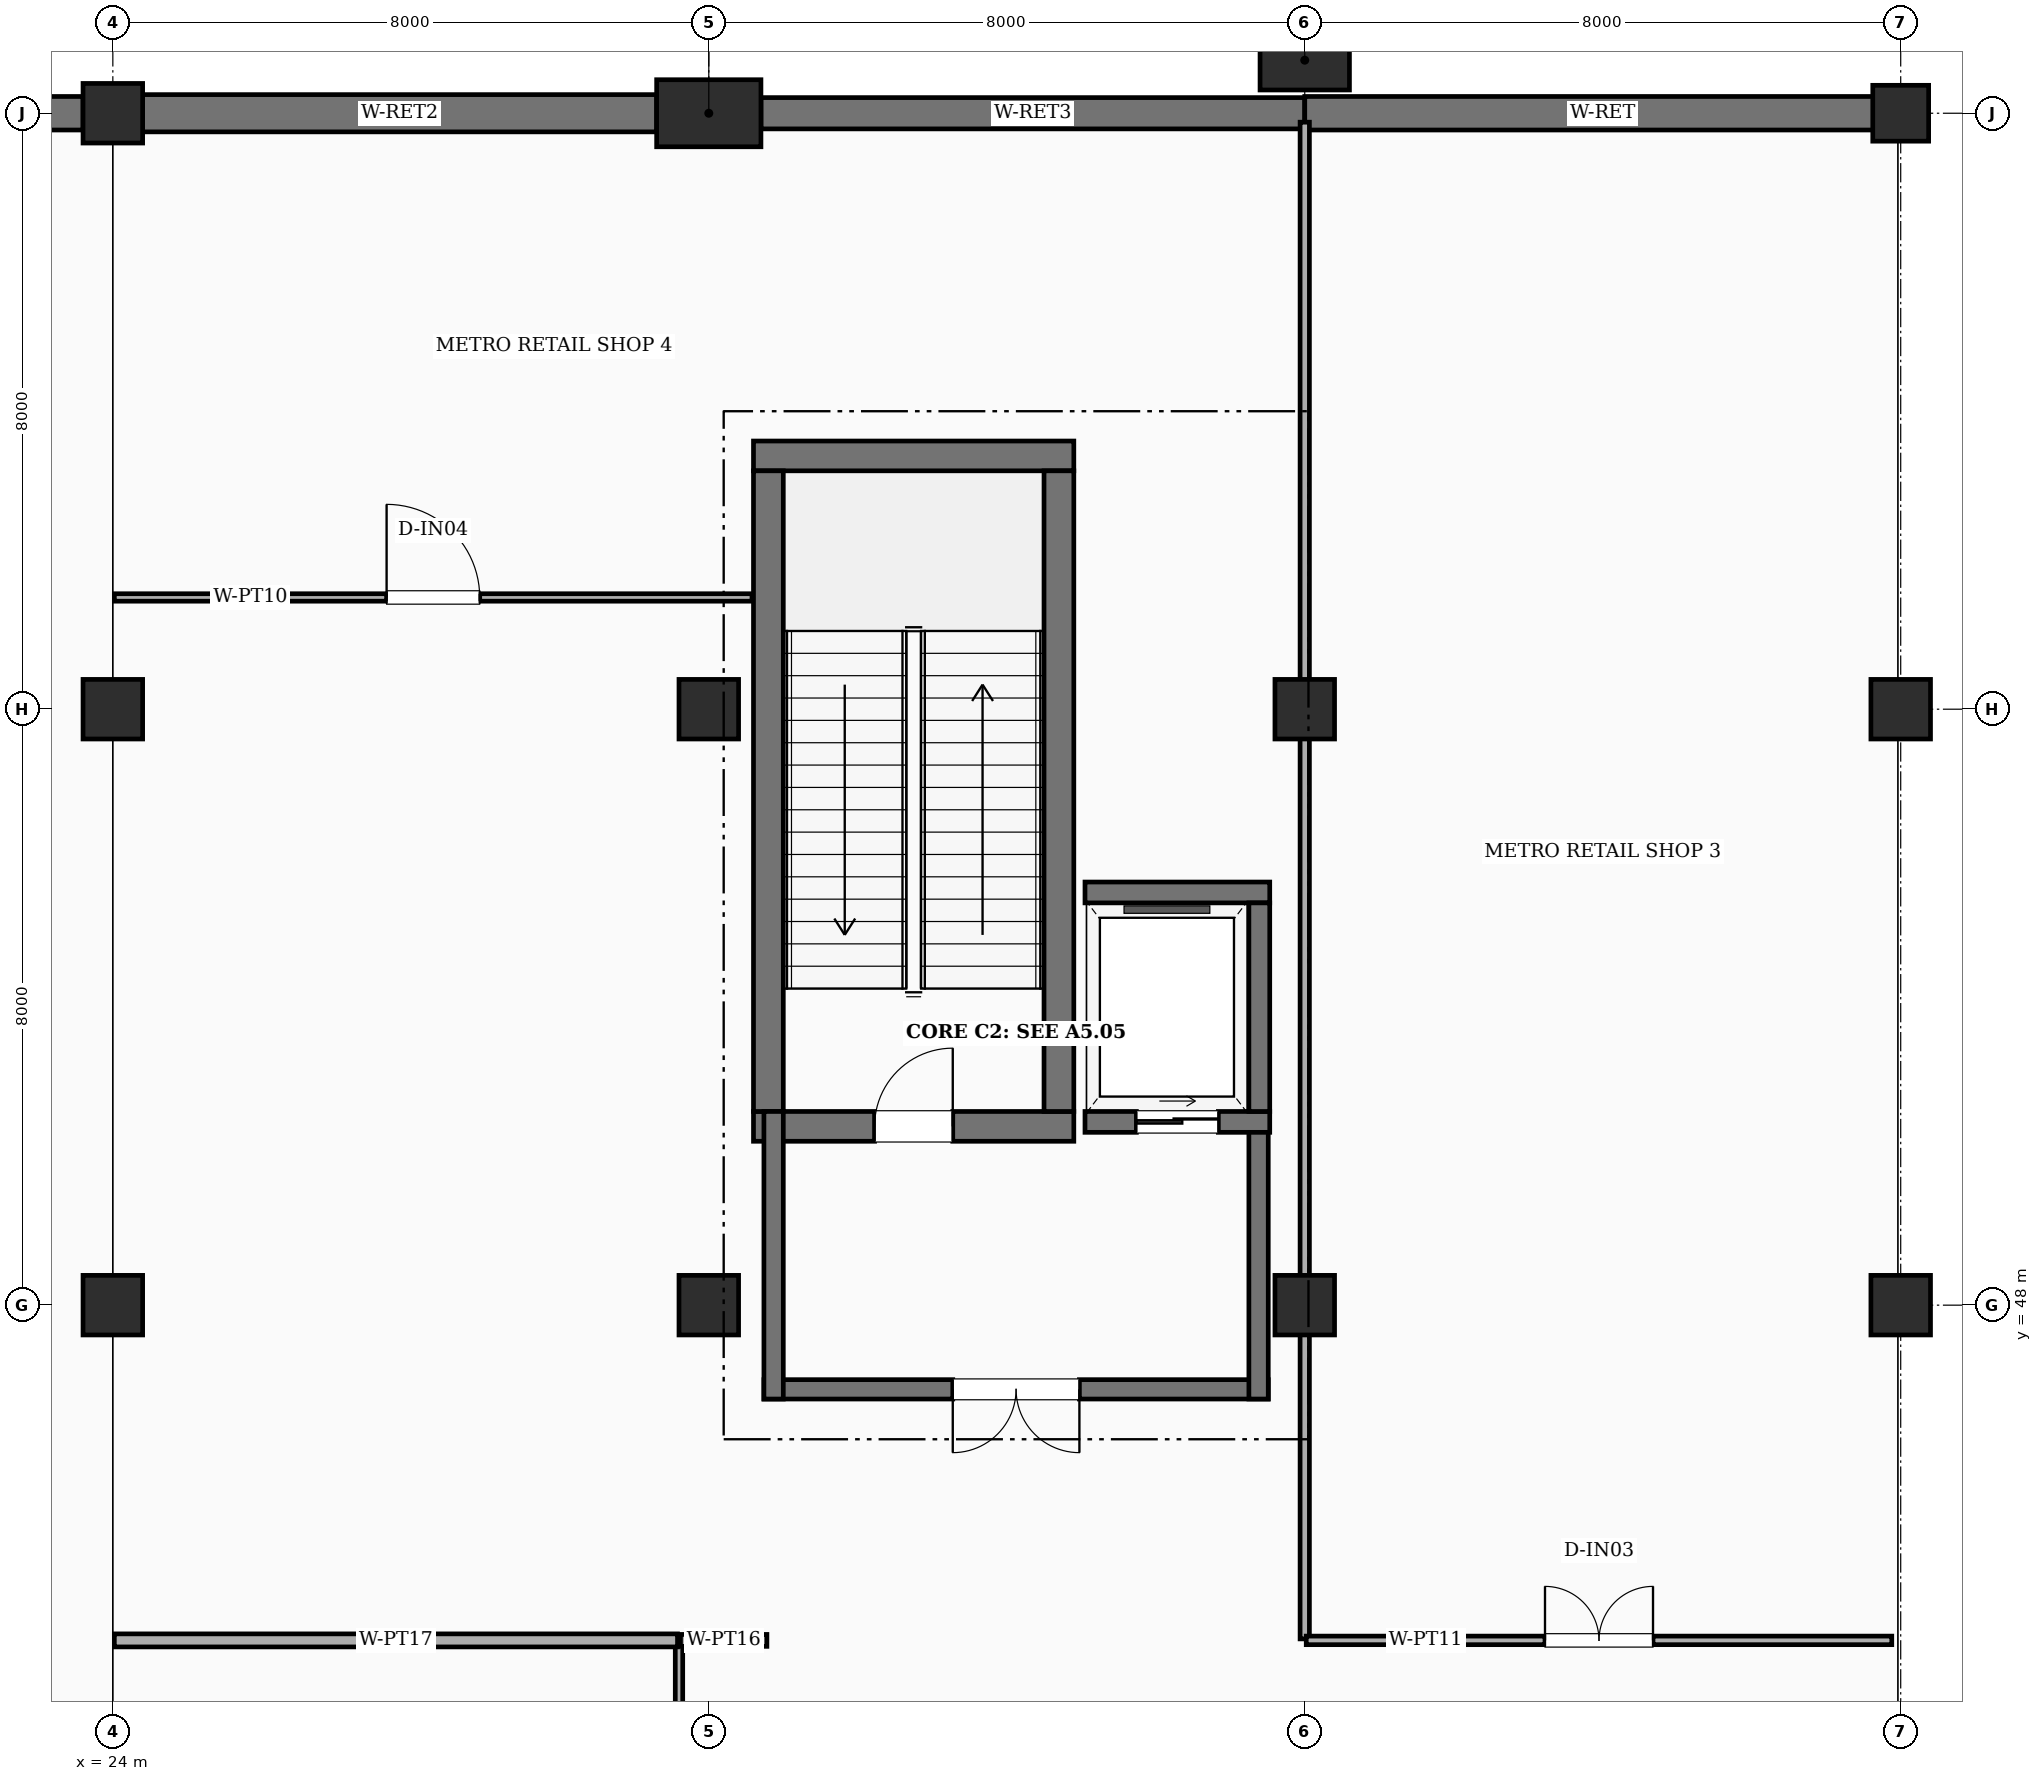
"""IFC4 building model, lengths in metres.
Left out: names, types, materials, properties, quantities, classifications, styles, units other than length and angle.
Written with IfcOpenShell. Run it as: python <this file> out.ifc"""

import sys

from ifc_helpers import new_model, si_unit, direction, frame, frame_2d, origin, origin_2d, place, context, subcontext, project, spatial, rectangle, extrude, element, fill, save


model = new_model("IFC4")
c1 = context("Model", 3, precision=1e-05, world=origin(), true_north=direction((0.0, 1.0)))
c2 = subcontext(c1, "Body", "Model", "MODEL_VIEW")
j1 = project(units=[si_unit("LENGTHUNIT", "METRE"), si_unit("PLANEANGLEUNIT", "RADIAN")], contexts=[c1])
p1 = place(None, origin())
s1 = spatial("IfcSite", under=j1, at=p1, CompositionType="ELEMENT")
p2 = place(p1, origin())
s2 = spatial("IfcBuilding", under=s1, at=p2, CompositionType="ELEMENT")
p3 = place(p2, frame((0.0, 0.0, -5.4)))
s3 = spatial("IfcBuildingStorey", under=s2, at=p3, CompositionType="ELEMENT", Elevation=-5.4)
p4 = place(p3, frame((32.0, 64.0, -0.4), z_axis=(0.0, 0.0, 1.0), x_axis=(1.0, 0.0, 0.0)))
e1 = element("IfcColumn", 1, at=p4, inside=s3, PredefinedType="COLUMN", context=c2, shape_type="SweptSolid", body=[
    extrude(rectangle(XDim=1.4, YDim=0.9, at=origin_2d()), origin(), (0.0, 0.0, 1.0), 5.8),
])
p5 = place(p3, frame((40.0, 64.712, -0.4), z_axis=(0.0, 0.0, 1.0), x_axis=(1.0, 0.0, 0.0)))
e2 = element("IfcColumn", 2, at=p5, inside=s3, PredefinedType="COLUMN", context=c2, shape_type="SweptSolid", body=[
    extrude(rectangle(XDim=1.2, YDim=0.8, at=origin_2d()), origin(), (0.0, 0.0, 1.0), 5.8),
])
for number, where, z_axis, x_axis in (
    (3, (24.0, 48.0, -0.4), (0.0, 0.0, 1.0), (1.0, 0.0, 0.0)),
    (4, (24.0, 56.0, -0.4), (0.0, 0.0, 1.0), (1.0, 0.0, 0.0)),
    (5, (24.0, 64.0, -0.4), (0.0, 0.0, 1.0), (1.0, 0.0, 0.0)),
    (6, (32.0, 48.0, -0.4), (0.0, 0.0, 1.0), (1.0, 0.0, 0.0)),
    (7, (32.0, 56.0, -0.4), (0.0, 0.0, 1.0), (1.0, 0.0, 0.0)),
    (8, (40.0, 48.0, -0.4), (0.0, 0.0, 1.0), (1.0, 0.0, 0.0)),
    (9, (40.0, 56.0, -0.4), (0.0, 0.0, 1.0), (1.0, 0.0, 0.0)),
    (10, (48.0, 48.0, -0.4), (0.0, 0.0, 1.0), (1.0, 0.0, 0.0)),
    (11, (48.0, 56.0, -0.4), (0.0, 0.0, 1.0), (1.0, 0.0, 0.0)),
):
    element("IfcColumn", number, at=place(p3, frame(where, z_axis=z_axis, x_axis=x_axis)), inside=s3, PredefinedType="COLUMN", context=c2, shape_type="SweptSolid", body=[
        extrude(rectangle(XDim=0.8, YDim=0.8, at=origin_2d()), origin(), (0.0, 0.0, 1.0), 5.8),
    ])
p6 = place(p3, frame((48.0, 64.0, -0.4), z_axis=(0.0, 0.0, 1.0), x_axis=(1.0, 0.0, 0.0)))
e12 = element("IfcColumn", 12, at=p6, inside=s3, PredefinedType="COLUMN", context=c2, shape_type="SweptSolid", body=[
    extrude(rectangle(XDim=0.75, YDim=0.75, at=origin_2d()), origin(), (0.0, 0.0, 1.0), 5.8),
])
p7 = place(p3, frame((16.375, 64.0, 0.0), z_axis=(0.0, 0.0, 1.0), x_axis=(1.0, 0.0, 0.0)))
e13 = element("IfcWall", 13, at=p7, inside=s3, PredefinedType="USERDEFINED", context=c2, shape_type="SweptSolid", body=[
    extrude(rectangle(XDim=7.225, YDim=0.45, at=frame_2d((3.613, 0.0))), origin(), (0.0, 0.0, 1.0), 5.0),
])
p8 = place(p3, frame((24.4, 64.0, 0.0), z_axis=(0.0, 0.0, 1.0), x_axis=(1.0, 0.0, 0.0)))
e14 = element("IfcWall", 14, at=p8, inside=s3, PredefinedType="USERDEFINED", context=c2, shape_type="SweptSolid", body=[
    extrude(rectangle(XDim=6.9, YDim=0.5, at=frame_2d((3.45, 0.0))), origin(), (0.0, 0.0, 1.0), 5.0),
])
p9 = place(p3, frame((32.7, 64.0, 0.0), z_axis=(0.0, 0.0, 1.0), x_axis=(1.0, 0.0, 0.0)))
e15 = element("IfcWall", 15, at=p9, inside=s3, PredefinedType="USERDEFINED", context=c2, shape_type="SweptSolid", body=[
    extrude(rectangle(XDim=7.3, YDim=0.42, at=frame_2d((3.65, 0.0))), origin(), (0.0, 0.0, 1.0), 4.15),
])
p10 = place(p3, frame((40.0, 64.0, 0.0), z_axis=(0.0, 0.0, 1.0), x_axis=(1.0, 0.0, 0.0)))
e16 = element("IfcWall", 16, at=p10, inside=s3, PredefinedType="USERDEFINED", context=c2, shape_type="SweptSolid", body=[
    extrude(rectangle(XDim=8.0, YDim=0.45, at=frame_2d((4.0, 0.0))), origin(), (0.0, 0.0, 1.0), 5.0),
])
p11 = place(p3, frame((32.6, 50.4, 0.0), z_axis=(0.0, 0.0, 1.0), x_axis=(1.0, 0.0, 0.0)))
e17 = element("IfcWall", 17, at=p11, inside=s3, PredefinedType="SHEAR", context=c2, shape_type="SweptSolid", body=[
    extrude(rectangle(XDim=4.3, YDim=0.4, at=frame_2d((2.15, 0.0))), origin(), (0.0, 0.0, 1.0), 5.4),
])
p12 = place(p11, frame((1.625, 0.0, 0.0)))
e18 = element("IfcOpeningElement", 18, at=p12, cuts=e17, PredefinedType="OPENING", context=c2, shape_type="SweptSolid", body=[
    extrude(rectangle(XDim=1.05, YDim=2.15, at=frame_2d((0.525, 1.075))), frame((0.0, 0.21, 0.0), z_axis=(0.0, -1.0, 0.0), x_axis=(1.0, 0.0, 0.0)), (0.0, 0.0, 1.0), 0.42),
])
p13 = place(p3, frame((32.6, 59.4, 0.0), z_axis=(0.0, 0.0, 1.0), x_axis=(1.0, 0.0, 0.0)))
e19 = element("IfcWall", 19, at=p13, inside=s3, PredefinedType="SHEAR", context=c2, shape_type="SweptSolid", body=[
    extrude(rectangle(XDim=4.3, YDim=0.4, at=frame_2d((2.15, 0.0))), origin(), (0.0, 0.0, 1.0), 5.4),
])
for number, where, z_axis, x_axis in (
    (20, (32.8, 50.6, 0.0), (0.0, 0.0, 1.0), (0.0, 1.0, 0.0)),
    (21, (36.7, 50.6, 0.0), (0.0, 0.0, 1.0), (0.0, 1.0, 0.0)),
):
    element("IfcWall", number, at=place(p3, frame(where, z_axis=z_axis, x_axis=x_axis)), inside=s3, PredefinedType="SHEAR", context=c2, shape_type="SweptSolid", body=[
        extrude(rectangle(XDim=8.6, YDim=0.4, at=frame_2d((4.3, 0.0))), origin(), (0.0, 0.0, 1.0), 5.4),
    ])
p14 = place(p3, frame((39.51, 46.87, 0.0), z_axis=(0.0, 0.0, 1.0), x_axis=(-1.0, 0.0, 0.0)))
e22 = element("IfcWall", 22, at=p14, inside=s3, PredefinedType="SHEAR", context=c2, shape_type="SweptSolid", body=[
    extrude(rectangle(XDim=6.77, YDim=0.26, at=frame_2d((3.385, 0.0))), origin(), (0.0, 0.0, 1.0), 5.4),
])
p15 = place(p14, frame((2.535, 0.0, 0.0)))
e23 = element("IfcOpeningElement", 23, at=p15, cuts=e22, PredefinedType="OPENING", context=c2, shape_type="SweptSolid", body=[
    extrude(rectangle(XDim=1.7, YDim=2.2, at=frame_2d((0.85, 1.1))), frame((0.0, 0.14, 0.0), z_axis=(0.0, -1.0, 0.0), x_axis=(1.0, 0.0, 0.0)), (0.0, 0.0, 1.0), 0.28),
])
for number, where, z_axis, x_axis in (
    (24, (32.87, 46.74, 0.0), (0.0, 0.0, 1.0), (0.0, 1.0, 0.0)),
    (25, (39.38, 46.74, 0.0), (0.0, 0.0, 1.0), (0.0, 1.0, 0.0)),
):
    element("IfcWall", number, at=place(p3, frame(where, z_axis=z_axis, x_axis=x_axis)), inside=s3, PredefinedType="SHEAR", context=c2, shape_type="SweptSolid", body=[
        extrude(rectangle(XDim=3.86, YDim=0.26, at=frame_2d((1.93, 0.0))), origin(), (0.0, 0.0, 1.0), 5.4),
    ])
p16 = place(p3, frame((37.05, 50.46, 0.0), z_axis=(0.0, 0.0, 1.0), x_axis=(1.0, 0.0, 0.0)))
e26 = element("IfcWall", 26, at=p16, inside=s3, PredefinedType="SHEAR", context=c2, shape_type="SweptSolid", body=[
    extrude(rectangle(XDim=2.48, YDim=0.28, at=frame_2d((1.24, 0.0))), origin(), (0.0, 0.0, 1.0), 5.4),
])
p17 = place(p16, frame((0.69, 0.0, 0.0)))
e27 = element("IfcOpeningElement", 27, at=p17, cuts=e26, PredefinedType="OPENING", context=c2, shape_type="SweptSolid", body=[
    extrude(rectangle(XDim=1.1, YDim=2.15, at=frame_2d((0.55, 1.075))), frame((0.0, 0.15, 0.0), z_axis=(0.0, -1.0, 0.0), x_axis=(1.0, 0.0, 0.0)), (0.0, 0.0, 1.0), 0.3),
])
p18 = place(p3, frame((37.05, 53.54, 0.0), z_axis=(0.0, 0.0, 1.0), x_axis=(1.0, 0.0, 0.0)))
e28 = element("IfcWall", 28, at=p18, inside=s3, PredefinedType="SHEAR", context=c2, shape_type="SweptSolid", body=[
    extrude(rectangle(XDim=2.48, YDim=0.28, at=frame_2d((1.24, 0.0))), origin(), (0.0, 0.0, 1.0), 5.4),
])
p19 = place(p3, frame((39.39, 50.6, 0.0), z_axis=(0.0, 0.0, 1.0), x_axis=(0.0, 1.0, 0.0)))
e29 = element("IfcWall", 29, at=p19, inside=s3, PredefinedType="SHEAR", context=c2, shape_type="SweptSolid", body=[
    extrude(rectangle(XDim=2.8, YDim=0.28, at=frame_2d((1.4, 0.0))), origin(), (0.0, 0.0, 1.0), 5.4),
])
p20 = place(p3, frame((31.6, 22.22, 0.0), z_axis=(0.0, 0.0, 1.0), x_axis=(0.0, 1.0, 0.0)))
e30 = element("IfcWall", 30, at=p20, inside=s3, PredefinedType="PARTITIONING", context=c2, shape_type="SweptSolid", body=[
    extrude(rectangle(XDim=21.26, YDim=0.1, at=frame_2d((10.63, 0.0))), origin(), (0.0, 0.0, 1.0), 4.15),
])
p21 = place(p20, frame((12.158, 0.0, 0.0)))
e31 = element("IfcOpeningElement", 31, at=p21, cuts=e30, PredefinedType="OPENING", context=c2, shape_type="SweptSolid", body=[
    extrude(rectangle(XDim=1.65, YDim=2.25, at=frame_2d((0.825, 1.125))), frame((0.0, 0.06, 0.0), z_axis=(0.0, -1.0, 0.0), x_axis=(1.0, 0.0, 0.0)), (0.0, 0.0, 1.0), 0.12),
])
p22 = place(p3, frame((24.02, 43.5, 0.0), z_axis=(0.0, 0.0, 1.0), x_axis=(1.0, 0.0, 0.0)))
e32 = element("IfcWall", 32, at=p22, inside=s3, PredefinedType="PARTITIONING", context=c2, shape_type="SweptSolid", body=[
    extrude(rectangle(XDim=7.56, YDim=0.175, at=frame_2d((3.78, 0.0))), origin(), (0.0, 0.0, 1.0), 4.15),
])
p23 = place(p3, frame((31.62, 43.5, 0.0), z_axis=(0.0, 0.0, 1.0), x_axis=(1.0, 0.0, 0.0)))
e33 = element("IfcWall", 33, at=p23, inside=s3, PredefinedType="PARTITIONING", context=c2, shape_type="SweptSolid", body=[
    extrude(rectangle(XDim=1.16, YDim=0.16, at=frame_2d((0.58, 0.0))), origin(), (0.0, 0.0, 1.0), 4.15),
])
p24 = place(p3, frame((40.0, 43.52, 0.0), z_axis=(0.0, 0.0, 1.0), x_axis=(0.0, 1.0, 0.0)))
e34 = element("IfcWall", 34, at=p24, inside=s3, PredefinedType="PARTITIONING", context=c2, shape_type="SweptSolid", body=[
    extrude(rectangle(XDim=20.36, YDim=0.125, at=frame_2d((10.18, 0.0))), origin(), (0.0, 0.0, 1.0), 4.15),
])
p25 = place(p3, frame((40.02, 43.5, 0.0), z_axis=(0.0, 0.0, 1.0), x_axis=(1.0, 0.0, 0.0)))
e35 = element("IfcWall", 35, at=p25, inside=s3, PredefinedType="PARTITIONING", context=c2, shape_type="SweptSolid", body=[
    extrude(rectangle(XDim=7.86, YDim=0.115, at=frame_2d((3.93, 0.0))), origin(), (0.0, 0.0, 1.0), 4.15),
])
p26 = place(p25, frame((3.205, 0.0, 0.0)))
e36 = element("IfcOpeningElement", 36, at=p26, cuts=e35, PredefinedType="OPENING", context=c2, shape_type="SweptSolid", body=[
    extrude(rectangle(XDim=1.45, YDim=2.2, at=frame_2d((0.725, 1.1))), frame((0.0, 0.067, 0.0), z_axis=(0.0, -1.0, 0.0), x_axis=(1.0, 0.0, 0.0)), (0.0, 0.0, 1.0), 0.135),
])
p27 = place(p3, frame((24.02, 57.5, 0.0), z_axis=(0.0, 0.0, 1.0), x_axis=(1.0, 0.0, 0.0)))
e37 = element("IfcWall", 37, at=p27, inside=s3, PredefinedType="PARTITIONING", context=c2, shape_type="SweptSolid", body=[
    extrude(rectangle(XDim=8.56, YDim=0.1, at=frame_2d((4.28, 0.0))), origin(), (0.0, 0.0, 1.0), 4.15),
])
p28 = place(p27, frame((3.655, 0.0, 0.0)))
e38 = element("IfcOpeningElement", 38, at=p28, cuts=e37, PredefinedType="OPENING", context=c2, shape_type="SweptSolid", body=[
    extrude(rectangle(XDim=1.25, YDim=2.15, at=frame_2d((0.625, 1.075))), frame((0.0, 0.06, 0.0), z_axis=(0.0, -1.0, 0.0), x_axis=(1.0, 0.0, 0.0)), (0.0, 0.0, 1.0), 0.12),
])
p29 = place(p12, origin())
e39 = element("IfcDoor", 39, at=p29, inside=s3, OperationType="SINGLE_SWING_RIGHT", PredefinedType="DOOR", context=c2, shape_type="SweptSolid", body=[
    extrude(rectangle(XDim=1.05, YDim=2.15, at=frame_2d((0.525, 1.075))), frame((0.0, 0.025, 0.0), z_axis=(0.0, -1.0, 0.0), x_axis=(1.0, 0.0, 0.0)), (0.0, 0.0, 1.0), 0.05),
])
fill(e18, e39)
p30 = place(p15, origin())
e40 = element("IfcDoor", 40, at=p30, inside=s3, OperationType="DOUBLE_DOOR_SINGLE_SWING", PredefinedType="DOOR", context=c2, shape_type="SweptSolid", body=[
    extrude(rectangle(XDim=1.7, YDim=2.2, at=frame_2d((0.85, 1.1))), frame((0.0, 0.025, 0.0), z_axis=(0.0, -1.0, 0.0), x_axis=(1.0, 0.0, 0.0)), (0.0, 0.0, 1.0), 0.05),
])
fill(e23, e40)
p31 = place(p17, origin())
e41 = element("IfcDoor", 41, at=p31, inside=s3, OperationType="SLIDING_TO_LEFT", PredefinedType="DOOR", context=c2, shape_type="SweptSolid", body=[
    extrude(rectangle(XDim=1.1, YDim=2.15, at=frame_2d((0.55, 1.075))), frame((0.0, 0.025, 0.0), z_axis=(0.0, -1.0, 0.0), x_axis=(1.0, 0.0, 0.0)), (0.0, 0.0, 1.0), 0.05),
])
fill(e27, e41)
p32 = place(p26, origin())
e42 = element("IfcDoor", 42, at=p32, inside=s3, OperationType="DOUBLE_DOOR_SINGLE_SWING", PredefinedType="DOOR", context=c2, shape_type="SweptSolid", body=[
    extrude(rectangle(XDim=1.45, YDim=2.2, at=frame_2d((0.725, 1.1))), frame((0.0, 0.025, 0.0), z_axis=(0.0, -1.0, 0.0), x_axis=(1.0, 0.0, 0.0)), (0.0, 0.0, 1.0), 0.05),
])
fill(e36, e42)
p33 = place(p28, origin())
e43 = element("IfcDoor", 43, at=p33, inside=s3, OperationType="SINGLE_SWING_LEFT", PredefinedType="DOOR", context=c2, shape_type="SweptSolid", body=[
    extrude(rectangle(XDim=1.25, YDim=2.15, at=frame_2d((0.625, 1.075))), frame((0.0, 0.025, 0.0), z_axis=(0.0, -1.0, 0.0), x_axis=(1.0, 0.0, 0.0)), (0.0, 0.0, 1.0), 0.05),
])
fill(e38, e43)
save(model, sys.argv[1])
